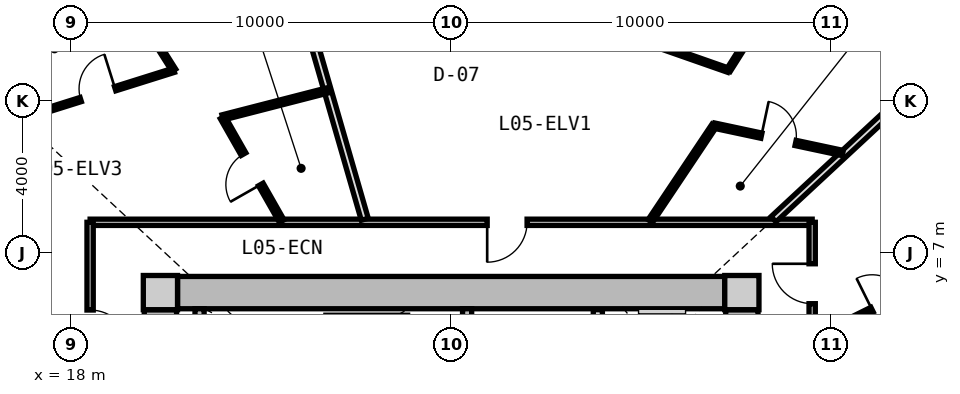
"""IFC4 building model, lengths in metres.
Left out: names, types, materials, properties, quantities, classifications, styles, units other than length and angle.
Written with IfcOpenShell. Run it as: python <this file> out.ifc"""

import sys

from ifc_helpers import new_model, si_unit, direction, frame, frame_2d, origin, origin_2d, place, context, subcontext, project, spatial, rectangle, extrude, source, transform, mapped, element, fill, save


model = new_model("IFC4")
c1 = context("Model", 3, precision=1e-05, world=origin(), true_north=direction((0.0, 1.0)))
c2 = subcontext(c1, "Body", "Model", "MODEL_VIEW")
j1 = project(units=[si_unit("LENGTHUNIT", "METRE"), si_unit("PLANEANGLEUNIT", "RADIAN")], contexts=[c1])
p1 = place(None, origin())
s1 = spatial("IfcSite", under=j1, at=p1, CompositionType="ELEMENT")
p2 = place(p1, origin())
s2 = spatial("IfcBuilding", under=s1, at=p2, CompositionType="ELEMENT")
p3 = place(p2, frame((0.0, 0.0, 21.6)))
s3 = spatial("IfcBuildingStorey", under=s2, at=p3, CompositionType="ELEMENT", Elevation=21.6)
m1 = source(origin(), c2, "Body", "SweptSolid", [
    extrude(rectangle(XDim=0.9, YDim=0.9, at=origin_2d()), origin(), (0.0, 0.0, 1.0), 3.05),
])
for number, where, z_axis, x_axis in (
    (1, (35.65, 5.95, 0.0), (0.0, 0.0, 1.0), (1.0, 0.0, 0.0)),
    (2, (20.35, 5.95, 0.0), (0.0, 0.0, 1.0), (1.0, 0.0, 0.0)),
):
    element("IfcColumn", number, at=place(p3, frame(where, z_axis=z_axis, x_axis=x_axis)), inside=s3, PredefinedType="COLUMN", context=c2, shape_type="MappedRepresentation", body=[
        mapped(m1, transform((0.0, 0.0, 0.0), x_axis=(1.0, 0.0, 0.0), y_axis=(0.0, 1.0, 0.0), z_axis=(0.0, 0.0, 1.0), scale=1.0)),
    ])
m2 = source(origin(), c2, "Body", "SweptSolid", [
    extrude(rectangle(XDim=14.4, YDim=0.85, at=frame_2d((7.2, 0.0))), origin(), (0.0, 0.0, 1.0), 2.79),
])
p4 = place(p3, frame((20.8, 5.95, 0.0), z_axis=(0.0, 0.0, 1.0), x_axis=(1.0, 0.0, 0.0)))
e3 = element("IfcWall", 3, at=p4, inside=s3, PredefinedType="SHEAR", context=c2, shape_type="MappedRepresentation", body=[
    mapped(m2, transform((0.0, 0.0, 0.0), x_axis=(1.0, 0.0, 0.0), y_axis=(0.0, 1.0, 0.0), z_axis=(0.0, 0.0, 1.0), scale=1.0)),
])
m3 = source(origin(), c2, "Body", "SweptSolid", [
    extrude(rectangle(XDim=11.0, YDim=0.85, at=frame_2d((5.5, 0.0))), origin(), (0.0, 0.0, 1.0), 2.79),
])
p5 = place(p3, frame((20.35, -5.5, 0.0), z_axis=(0.0, 0.0, 1.0), x_axis=(0.0, 1.0, 0.0)))
e4 = element("IfcWall", 4, at=p5, inside=s3, PredefinedType="SHEAR", context=c2, shape_type="MappedRepresentation", body=[
    mapped(m3, transform((0.0, 0.0, 0.0), x_axis=(1.0, 0.0, 0.0), y_axis=(0.0, 1.0, 0.0), z_axis=(0.0, 0.0, 1.0), scale=1.0)),
])
p6 = place(p5, frame((3.8, 0.0, 0.0)))
e5 = element("IfcOpeningElement", 5, at=p6, cuts=e4, PredefinedType="OPENING", context=c2, shape_type="SweptSolid", body=[
    extrude(rectangle(XDim=1.2, YDim=2.15, at=frame_2d((0.6, 1.075))), frame((0.0, 0.435, 0.0), z_axis=(0.0, -1.0, 0.0), x_axis=(1.0, 0.0, 0.0)), (0.0, 0.0, 1.0), 0.87),
])
p7 = place(p3, frame((35.65, 5.5, 0.0), z_axis=(0.0, 0.0, 1.0), x_axis=(0.0, -1.0, 0.0)))
e6 = element("IfcWall", 6, at=p7, inside=s3, PredefinedType="SHEAR", context=c2, shape_type="MappedRepresentation", body=[
    mapped(m3, transform((0.0, 0.0, 0.0), x_axis=(1.0, 0.0, 0.0), y_axis=(0.0, 1.0, 0.0), z_axis=(0.0, 0.0, 1.0), scale=1.0)),
])
p8 = place(p7, frame((5.65, 0.0, 0.0)))
e7 = element("IfcOpeningElement", 7, at=p8, cuts=e6, PredefinedType="OPENING", context=c2, shape_type="SweptSolid", body=[
    extrude(rectangle(XDim=1.2, YDim=2.15, at=frame_2d((0.6, 1.075))), frame((0.0, 0.435, 0.0), z_axis=(0.0, -1.0, 0.0), x_axis=(1.0, 0.0, 0.0)), (0.0, 0.0, 1.0), 0.87),
])
p9 = place(p7, frame((9.3, 0.0, 0.0)))
e8 = element("IfcOpeningElement", 8, at=p9, cuts=e6, PredefinedType="OPENING", context=c2, shape_type="SweptSolid", body=[
    extrude(rectangle(XDim=1.0, YDim=2.1, at=frame_2d((0.5, 1.05))), frame((0.0, 0.435, 0.0), z_axis=(0.0, -1.0, 0.0), x_axis=(1.0, 0.0, 0.0)), (0.0, 0.0, 1.0), 0.87),
])
m4 = source(origin(), c2, "Body", "SweptSolid", [
    extrude(rectangle(XDim=3.075, YDim=0.24, at=frame_2d((1.538, 0.0))), origin(), (0.0, 0.0, 1.0), 2.79),
])
p10 = place(p3, frame((21.38, 2.45, 0.0), z_axis=(0.0, 0.0, 1.0), x_axis=(0.0, 1.0, 0.0)))
e9 = element("IfcWall", 9, at=p10, inside=s3, PredefinedType="PARTITIONING", context=c2, shape_type="MappedRepresentation", body=[
    mapped(m4, transform((0.0, 0.0, 0.0), x_axis=(1.0, 0.0, 0.0), y_axis=(0.0, 1.0, 0.0), z_axis=(0.0, 0.0, 1.0), scale=1.0)),
])
p11 = place(p3, frame((28.42, 2.45, 0.0), z_axis=(0.0, 0.0, 1.0), x_axis=(0.0, 1.0, 0.0)))
e10 = element("IfcWall", 10, at=p11, inside=s3, PredefinedType="PARTITIONING", context=c2, shape_type="MappedRepresentation", body=[
    mapped(m4, transform((0.0, 0.0, 0.0), x_axis=(1.0, 0.0, 0.0), y_axis=(0.0, 1.0, 0.0), z_axis=(0.0, 0.0, 1.0), scale=1.0)),
])
p12 = place(p11, frame((0.55, 0.0, 0.0)))
e11 = element("IfcOpeningElement", 11, at=p12, cuts=e10, PredefinedType="OPENING", context=c2, shape_type="SweptSolid", body=[
    extrude(rectangle(XDim=1.1, YDim=2.15, at=frame_2d((0.55, 1.075))), frame((0.0, 0.13, 0.0), z_axis=(0.0, -1.0, 0.0), x_axis=(1.0, 0.0, 0.0)), (0.0, 0.0, 1.0), 0.26),
])
m5 = source(origin(), c2, "Body", "SweptSolid", [
    extrude(rectangle(XDim=5.0, YDim=0.24, at=frame_2d((2.5, 0.0))), origin(), (0.0, 0.0, 1.0), 2.775),
])
p13 = place(p3, frame((31.86, 0.5, 0.0), z_axis=(0.0, 0.0, 1.0), x_axis=(0.0, 1.0, 0.0)))
e12 = element("IfcWall", 12, at=p13, inside=s3, PredefinedType="PARTITIONING", context=c2, shape_type="MappedRepresentation", body=[
    mapped(m5, transform((0.0, 0.0, 0.0), x_axis=(1.0, 0.0, 0.0), y_axis=(0.0, 1.0, 0.0), z_axis=(0.0, 0.0, 1.0), scale=1.0)),
])
p14 = place(p13, frame((3.05, 0.0, 0.0)))
e13 = element("IfcOpeningElement", 13, at=p14, cuts=e12, PredefinedType="OPENING", context=c2, shape_type="SweptSolid", body=[
    extrude(rectangle(XDim=1.3, YDim=2.2, at=frame_2d((0.65, 1.1))), frame((0.0, 0.13, 0.0), z_axis=(0.0, -1.0, 0.0), x_axis=(1.0, 0.0, 0.0)), (0.0, 0.0, 1.0), 0.26),
])
p15 = place(p13, frame((0.55, 0.0, 0.0)))
e14 = element("IfcOpeningElement", 14, at=p15, cuts=e12, PredefinedType="OPENING", context=c2, shape_type="SweptSolid", body=[
    extrude(rectangle(XDim=1.3, YDim=2.2, at=frame_2d((0.65, 1.1))), frame((0.0, 0.13, 0.0), z_axis=(0.0, -1.0, 0.0), x_axis=(1.0, 0.0, 0.0)), (0.0, 0.0, 1.0), 0.26),
])
m6 = source(origin(), c2, "Body", "SweptSolid", [
    extrude(rectangle(XDim=19.0, YDim=0.165, at=frame_2d((9.5, 0.0))), origin(), (0.0, 0.0, 1.0), 2.775),
])
p16 = place(p3, frame((18.5, 7.8, 0.0), z_axis=(0.0, 0.0, 1.0), x_axis=(1.0, 0.0, 0.0)))
e15 = element("IfcWall", 15, at=p16, inside=s3, PredefinedType="PARTITIONING", context=c2, shape_type="MappedRepresentation", body=[
    mapped(m6, transform((0.0, 0.0, 0.0), x_axis=(1.0, 0.0, 0.0), y_axis=(0.0, 1.0, 0.0), z_axis=(0.0, 0.0, 1.0), scale=1.0)),
])
p17 = place(p16, frame((10.448, 0.0, 0.0)))
e16 = element("IfcOpeningElement", 16, at=p17, cuts=e15, PredefinedType="OPENING", context=c2, shape_type="SweptSolid", body=[
    extrude(rectangle(XDim=1.05, YDim=2.15, at=frame_2d((0.525, 1.075))), frame((0.0, 0.093, 0.0), z_axis=(0.0, -1.0, 0.0), x_axis=(1.0, 0.0, 0.0)), (0.0, 0.0, 1.0), 0.185),
])
m7 = source(origin(), c2, "Body", "SweptSolid", [
    extrude(rectangle(XDim=15.6, YDim=0.165, at=frame_2d((7.8, 0.0))), origin(), (0.0, 0.0, 1.0), 2.775),
])
p18 = place(p3, frame((18.5, -7.8, 0.0), z_axis=(0.0, 0.0, 1.0), x_axis=(0.0, 1.0, 0.0)))
e17 = element("IfcWall", 17, at=p18, inside=s3, PredefinedType="PARTITIONING", context=c2, shape_type="MappedRepresentation", body=[
    mapped(m7, transform((0.0, 0.0, 0.0), x_axis=(1.0, 0.0, 0.0), y_axis=(0.0, 1.0, 0.0), z_axis=(0.0, 0.0, 1.0), scale=1.0)),
])
p19 = place(p18, frame((12.241, 0.0, 0.0)))
e18 = element("IfcOpeningElement", 18, at=p19, cuts=e17, PredefinedType="OPENING", context=c2, shape_type="SweptSolid", body=[
    extrude(rectangle(XDim=1.05, YDim=2.15, at=frame_2d((0.525, 1.075))), frame((0.0, 0.093, 0.0), z_axis=(0.0, -1.0, 0.0), x_axis=(1.0, 0.0, 0.0)), (0.0, 0.0, 1.0), 0.185),
])
p20 = place(p18, frame((3.63, 0.0, 0.0)))
e19 = element("IfcOpeningElement", 19, at=p20, cuts=e17, PredefinedType="OPENING", context=c2, shape_type="SweptSolid", body=[
    extrude(rectangle(XDim=1.05, YDim=2.15, at=frame_2d((0.525, 1.075))), frame((0.0, 0.093, 0.0), z_axis=(0.0, -1.0, 0.0), x_axis=(1.0, 0.0, 0.0)), (0.0, 0.0, 1.0), 0.185),
])
p21 = place(p3, frame((37.5, 7.8, 0.0), z_axis=(0.0, 0.0, 1.0), x_axis=(0.0, -1.0, 0.0)))
e20 = element("IfcWall", 20, at=p21, inside=s3, PredefinedType="PARTITIONING", context=c2, shape_type="MappedRepresentation", body=[
    mapped(m7, transform((0.0, 0.0, 0.0), x_axis=(1.0, 0.0, 0.0), y_axis=(0.0, 1.0, 0.0), z_axis=(0.0, 0.0, 1.0), scale=1.0)),
])
p22 = place(p21, frame((12.141, 0.0, 0.0)))
e21 = element("IfcOpeningElement", 21, at=p22, cuts=e20, PredefinedType="OPENING", context=c2, shape_type="SweptSolid", body=[
    extrude(rectangle(XDim=1.25, YDim=2.2, at=frame_2d((0.625, 1.1))), frame((0.0, 0.093, 0.0), z_axis=(0.0, -1.0, 0.0), x_axis=(1.0, 0.0, 0.0)), (0.0, 0.0, 1.0), 0.185),
])
p23 = place(p21, frame((6.196, 0.0, 0.0)))
e22 = element("IfcOpeningElement", 22, at=p23, cuts=e20, PredefinedType="OPENING", context=c2, shape_type="SweptSolid", body=[
    extrude(rectangle(XDim=1.05, YDim=2.15, at=frame_2d((0.525, 1.075))), frame((0.0, 0.093, 0.0), z_axis=(0.0, -1.0, 0.0), x_axis=(1.0, 0.0, 0.0)), (0.0, 0.0, 1.0), 0.185),
])
p24 = place(p21, frame((1.092, 0.0, 0.0)))
e23 = element("IfcOpeningElement", 23, at=p24, cuts=e20, PredefinedType="OPENING", context=c2, shape_type="SweptSolid", body=[
    extrude(rectangle(XDim=1.05, YDim=2.15, at=frame_2d((0.525, 1.075))), frame((0.0, 0.093, 0.0), z_axis=(0.0, -1.0, 0.0), x_axis=(1.0, 0.0, 0.0)), (0.0, 0.0, 1.0), 0.185),
])
m8 = source(origin(), c2, "Body", "SweptSolid", [
    extrude(rectangle(XDim=7.435, YDim=0.19, at=frame_2d((3.717, 0.0))), origin(), (0.0, 0.0, 1.0), 2.225),
])
p25 = place(p3, frame((36.483, 7.88, 0.0), z_axis=(0.0, 0.0, 1.0), x_axis=(0.732651956848, 0.680603489652, 0.0)))
e24 = element("IfcWall", 24, at=p25, inside=s3, PredefinedType="PARTITIONING", context=c2, shape_type="MappedRepresentation", body=[
    mapped(m8, transform((0.0, 0.0, 0.0), x_axis=(1.0, 0.0, 0.0), y_axis=(0.0, 1.0, 0.0), z_axis=(0.0, 0.0, 1.0), scale=1.0)),
])
m9 = source(origin(), c2, "Body", "SweptSolid", [
    extrude(rectangle(XDim=10.196, YDim=0.19, at=frame_2d((5.098, 0.0))), origin(), (0.0, 0.0, 1.0), 2.225),
])
p26 = place(p3, frame((25.727, 7.88, 0.0), z_axis=(0.0, 0.0, 1.0), x_axis=(-0.277136420347, 0.960830580549, 0.0)))
e25 = element("IfcWall", 25, at=p26, inside=s3, PredefinedType="PARTITIONING", context=c2, shape_type="MappedRepresentation", body=[
    mapped(m9, transform((0.0, 0.0, 0.0), x_axis=(1.0, 0.0, 0.0), y_axis=(0.0, 1.0, 0.0), z_axis=(0.0, 0.0, 1.0), scale=1.0)),
])
m10 = source(origin(), c2, "Body", "SweptSolid", [
    extrude(rectangle(XDim=3.025, YDim=0.14, at=frame_2d((1.513, 0.0))), origin(), (0.0, 0.0, 1.0), 2.775),
])
p27 = place(p3, frame((33.24, 7.83, 0.0), z_axis=(0.0, 0.0, 1.0), x_axis=(0.556189165904, 0.831055721195, 0.0)))
e26 = element("IfcWall", 26, at=p27, inside=s3, PredefinedType="PARTITIONING", context=c2, shape_type="MappedRepresentation", body=[
    mapped(m10, transform((0.0, 0.0, 0.0), x_axis=(1.0, 0.0, 0.0), y_axis=(0.0, 1.0, 0.0), z_axis=(0.0, 0.0, 1.0), scale=1.0)),
])
m11 = source(origin(), c2, "Body", "SweptSolid", [
    extrude(rectangle(XDim=3.459, YDim=0.14, at=frame_2d((1.729, 0.0))), origin(), (0.0, 0.0, 1.0), 2.775),
])
p28 = place(p3, frame((34.922, 10.344, 0.0), z_axis=(0.0, 0.0, 1.0), x_axis=(0.978006468578, -0.208574560815, 0.0)))
e27 = element("IfcWall", 27, at=p28, inside=s3, PredefinedType="PARTITIONING", context=c2, shape_type="MappedRepresentation", body=[
    mapped(m11, transform((0.0, 0.0, 0.0), x_axis=(1.0, 0.0, 0.0), y_axis=(0.0, 1.0, 0.0), z_axis=(0.0, 0.0, 1.0), scale=1.0)),
])
p29 = place(p28, frame((1.27, 0.0, 0.0)))
e28 = element("IfcOpeningElement", 28, at=p29, cuts=e27, PredefinedType="OPENING", context=c2, shape_type="SweptSolid", body=[
    extrude(rectangle(XDim=0.92, YDim=2.1, at=frame_2d((0.46, 1.05))), frame((0.0, 0.08, 0.0), z_axis=(0.0, -1.0, 0.0), x_axis=(1.0, 0.0, 0.0)), (0.0, 0.0, 1.0), 0.16),
])
m12 = source(origin(), c2, "Body", "SweptSolid", [
    extrude(rectangle(XDim=4.15, YDim=0.115, at=frame_2d((2.075, 0.0))), origin(), (0.0, 0.0, 1.0), 2.775),
])
p30 = place(p3, frame((35.296, 11.801, 0.0), z_axis=(0.0, 0.0, 1.0), x_axis=(0.534475378192, 0.845184045109, 0.0)))
e29 = element("IfcWall", 29, at=p30, inside=s3, PredefinedType="PARTITIONING", context=c2, shape_type="MappedRepresentation", body=[
    mapped(m12, transform((0.0, 0.0, 0.0), x_axis=(1.0, 0.0, 0.0), y_axis=(0.0, 1.0, 0.0), z_axis=(0.0, 0.0, 1.0), scale=1.0)),
])
p31 = place(p30, frame((1.6, 0.0, 0.0)))
e30 = element("IfcOpeningElement", 30, at=p31, cuts=e29, PredefinedType="OPENING", context=c2, shape_type="SweptSolid", body=[
    extrude(rectangle(XDim=0.95, YDim=2.1, at=frame_2d((0.475, 1.05))), frame((0.0, 0.067, 0.0), z_axis=(0.0, -1.0, 0.0), x_axis=(1.0, 0.0, 0.0)), (0.0, 0.0, 1.0), 0.135),
])
m13 = source(origin(), c2, "Body", "SweptSolid", [
    extrude(rectangle(XDim=3.765, YDim=0.115, at=frame_2d((1.882, 0.0))), origin(), (0.0, 0.0, 1.0), 2.775),
])
p32 = place(p3, frame((35.296, 11.801, 0.0), z_axis=(0.0, 0.0, 1.0), x_axis=(-0.943788572669, 0.330549739222, 0.0)))
e31 = element("IfcWall", 31, at=p32, inside=s3, PredefinedType="PARTITIONING", context=c2, shape_type="MappedRepresentation", body=[
    mapped(m13, transform((0.0, 0.0, 0.0), x_axis=(1.0, 0.0, 0.0), y_axis=(0.0, 1.0, 0.0), z_axis=(0.0, 0.0, 1.0), scale=1.0)),
])
m14 = source(origin(), c2, "Body", "SweptSolid", [
    extrude(rectangle(XDim=3.141, YDim=0.14, at=frame_2d((1.571, 0.0))), origin(), (0.0, 0.0, 1.0), 2.775),
])
p33 = place(p3, frame((23.542, 7.83, 0.0), z_axis=(0.0, 0.0, 1.0), x_axis=(-0.494874486088, 0.868964465913, 0.0)))
e32 = element("IfcWall", 32, at=p33, inside=s3, PredefinedType="PARTITIONING", context=c2, shape_type="MappedRepresentation", body=[
    mapped(m14, transform((0.0, 0.0, 0.0), x_axis=(1.0, 0.0, 0.0), y_axis=(0.0, 1.0, 0.0), z_axis=(0.0, 0.0, 1.0), scale=1.0)),
])
p34 = place(p33, frame((1.111, 0.0, 0.0)))
e33 = element("IfcOpeningElement", 33, at=p34, cuts=e32, PredefinedType="OPENING", context=c2, shape_type="SweptSolid", body=[
    extrude(rectangle(XDim=0.92, YDim=2.1, at=frame_2d((0.46, 1.05))), frame((0.0, 0.08, 0.0), z_axis=(0.0, -1.0, 0.0), x_axis=(1.0, 0.0, 0.0)), (0.0, 0.0, 1.0), 0.16),
])
m15 = source(origin(), c2, "Body", "SweptSolid", [
    extrude(rectangle(XDim=2.868, YDim=0.14, at=frame_2d((1.434, 0.0))), origin(), (0.0, 0.0, 1.0), 2.775),
])
p35 = place(p3, frame((21.987, 10.56, 0.0), z_axis=(0.0, 0.0, 1.0), x_axis=(0.968467705195, 0.249139125778, 0.0)))
e34 = element("IfcWall", 34, at=p35, inside=s3, PredefinedType="PARTITIONING", context=c2, shape_type="MappedRepresentation", body=[
    mapped(m15, transform((0.0, 0.0, 0.0), x_axis=(1.0, 0.0, 0.0), y_axis=(0.0, 1.0, 0.0), z_axis=(0.0, 0.0, 1.0), scale=1.0)),
])
p36 = place(p3, frame((20.704, 11.801, 0.0), z_axis=(0.0, 0.0, 1.0), x_axis=(-0.534475378192, 0.845184045109, 0.0)))
e35 = element("IfcWall", 35, at=p36, inside=s3, PredefinedType="PARTITIONING", context=c2, shape_type="MappedRepresentation", body=[
    mapped(m12, transform((0.0, 0.0, 0.0), x_axis=(1.0, 0.0, 0.0), y_axis=(0.0, 1.0, 0.0), z_axis=(0.0, 0.0, 1.0), scale=1.0)),
])
m16 = source(origin(), c2, "Body", "SweptSolid", [
    extrude(rectangle(XDim=4.189, YDim=0.115, at=frame_2d((2.094, 0.0))), origin(), (0.0, 0.0, 1.0), 2.775),
])
p37 = place(p3, frame((20.704, 11.801, 0.0), z_axis=(0.0, 0.0, 1.0), x_axis=(-0.954002766053, -0.299797802467, 0.0)))
e36 = element("IfcWall", 36, at=p37, inside=s3, PredefinedType="PARTITIONING", context=c2, shape_type="MappedRepresentation", body=[
    mapped(m16, transform((0.0, 0.0, 0.0), x_axis=(1.0, 0.0, 0.0), y_axis=(0.0, 1.0, 0.0), z_axis=(0.0, 0.0, 1.0), scale=1.0)),
])
p38 = place(p37, frame((1.619, 0.0, 0.0)))
e37 = element("IfcOpeningElement", 37, at=p38, cuts=e36, PredefinedType="OPENING", context=c2, shape_type="SweptSolid", body=[
    extrude(rectangle(XDim=0.95, YDim=2.1, at=frame_2d((0.475, 1.05))), frame((0.0, 0.067, 0.0), z_axis=(0.0, -1.0, 0.0), x_axis=(1.0, 0.0, 0.0)), (0.0, 0.0, 1.0), 0.135),
])
m17 = source(origin(), c2, "Body", "SweptSolid", [
    extrude(rectangle(XDim=4.374, YDim=0.14, at=frame_2d((2.187, 0.0))), origin(), (0.0, 0.0, 1.0), 2.775),
])
p39 = place(p3, frame((37.53, 4.732, 0.0), z_axis=(0.0, 0.0, 1.0), x_axis=(0.89568523908, 0.444688601714, 0.0)))
e38 = element("IfcWall", 38, at=p39, inside=s3, PredefinedType="PARTITIONING", context=c2, shape_type="MappedRepresentation", body=[
    mapped(m17, transform((0.0, 0.0, 0.0), x_axis=(1.0, 0.0, 0.0), y_axis=(0.0, 1.0, 0.0), z_axis=(0.0, 0.0, 1.0), scale=1.0)),
])
p40 = place(p39, frame((1.727, 0.0, 0.0)))
e39 = element("IfcOpeningElement", 39, at=p40, cuts=e38, PredefinedType="OPENING", context=c2, shape_type="SweptSolid", body=[
    extrude(rectangle(XDim=0.92, YDim=2.1, at=frame_2d((0.46, 1.05))), frame((0.0, 0.08, 0.0), z_axis=(0.0, -1.0, 0.0), x_axis=(1.0, 0.0, 0.0)), (0.0, 0.0, 1.0), 0.16),
])
m18 = source(origin(), c2, "Body", "SweptSolid", [
    extrude(rectangle(XDim=1.05, YDim=2.15, at=frame_2d((0.525, 1.075))), frame((0.0, 0.025, 0.0), z_axis=(0.0, -1.0, 0.0), x_axis=(1.0, 0.0, 0.0)), (0.0, 0.0, 1.0), 0.05),
])
p41 = place(p17, frame((1.05, 0.0, 0.0), z_axis=(0.0, 0.0, 1.0), x_axis=(-1.0, 0.0, 0.0)))
e40 = element("IfcDoor", 40, at=p41, inside=s3, OperationType="SINGLE_SWING_RIGHT", PredefinedType="DOOR", context=c2, shape_type="MappedRepresentation", body=[
    mapped(m18, transform((0.0, 0.0, 0.0), x_axis=(1.0, 0.0, 0.0), y_axis=(0.0, 1.0, 0.0), z_axis=(0.0, 0.0, 1.0), scale=1.0)),
])
fill(e16, e40)
m19 = source(origin(), c2, "Body", "SweptSolid", [
    extrude(rectangle(XDim=0.92, YDim=2.1, at=frame_2d((0.46, 1.05))), frame((0.0, 0.025, 0.0), z_axis=(0.0, -1.0, 0.0), x_axis=(1.0, 0.0, 0.0)), (0.0, 0.0, 1.0), 0.05),
])
p42 = place(p29, origin())
e41 = element("IfcDoor", 41, at=p42, inside=s3, OperationType="SINGLE_SWING_LEFT", PredefinedType="DOOR", context=c2, shape_type="MappedRepresentation", body=[
    mapped(m19, transform((0.0, 0.0, 0.0), x_axis=(1.0, 0.0, 0.0), y_axis=(0.0, 1.0, 0.0), z_axis=(0.0, 0.0, 1.0), scale=1.0)),
])
fill(e28, e41)
p43 = place(p19, frame((1.05, 0.0, 0.0), z_axis=(0.0, 0.0, 1.0), x_axis=(-1.0, 0.0, 0.0)))
e42 = element("IfcDoor", 42, at=p43, inside=s3, OperationType="SINGLE_SWING_RIGHT", PredefinedType="DOOR", context=c2, shape_type="MappedRepresentation", body=[
    mapped(m18, transform((0.0, 0.0, 0.0), x_axis=(1.0, 0.0, 0.0), y_axis=(0.0, 1.0, 0.0), z_axis=(0.0, 0.0, 1.0), scale=1.0)),
])
fill(e18, e42)
p44 = place(p34, origin())
e43 = element("IfcDoor", 43, at=p44, inside=s3, OperationType="SINGLE_SWING_LEFT", PredefinedType="DOOR", context=c2, shape_type="MappedRepresentation", body=[
    mapped(m19, transform((0.0, 0.0, 0.0), x_axis=(1.0, 0.0, 0.0), y_axis=(0.0, 1.0, 0.0), z_axis=(0.0, 0.0, 1.0), scale=1.0)),
])
fill(e33, e43)
m20 = source(origin(), c2, "Body", "SweptSolid", [
    extrude(rectangle(XDim=0.95, YDim=2.1, at=frame_2d((0.475, 1.05))), frame((0.0, 0.025, 0.0), z_axis=(0.0, -1.0, 0.0), x_axis=(1.0, 0.0, 0.0)), (0.0, 0.0, 1.0), 0.05),
])
p45 = place(p38, frame((0.95, 0.0, 0.0), z_axis=(0.0, 0.0, 1.0), x_axis=(-1.0, 0.0, 0.0)))
e44 = element("IfcDoor", 44, at=p45, inside=s3, OperationType="SINGLE_SWING_RIGHT", PredefinedType="DOOR", context=c2, shape_type="MappedRepresentation", body=[
    mapped(m20, transform((0.0, 0.0, 0.0), x_axis=(1.0, 0.0, 0.0), y_axis=(0.0, 1.0, 0.0), z_axis=(0.0, 0.0, 1.0), scale=1.0)),
])
fill(e37, e44)
p46 = place(p24, frame((1.05, 0.0, 0.0), z_axis=(0.0, 0.0, 1.0), x_axis=(-1.0, 0.0, 0.0)))
e45 = element("IfcDoor", 45, at=p46, inside=s3, OperationType="SINGLE_SWING_RIGHT", PredefinedType="DOOR", context=c2, shape_type="MappedRepresentation", body=[
    mapped(m18, transform((0.0, 0.0, 0.0), x_axis=(1.0, 0.0, 0.0), y_axis=(0.0, 1.0, 0.0), z_axis=(0.0, 0.0, 1.0), scale=1.0)),
])
fill(e23, e45)
p47 = place(p40, origin())
e46 = element("IfcDoor", 46, at=p47, inside=s3, OperationType="SINGLE_SWING_LEFT", PredefinedType="DOOR", context=c2, shape_type="MappedRepresentation", body=[
    mapped(m19, transform((0.0, 0.0, 0.0), x_axis=(1.0, 0.0, 0.0), y_axis=(0.0, 1.0, 0.0), z_axis=(0.0, 0.0, 1.0), scale=1.0)),
])
fill(e39, e46)
save(model, sys.argv[1])
